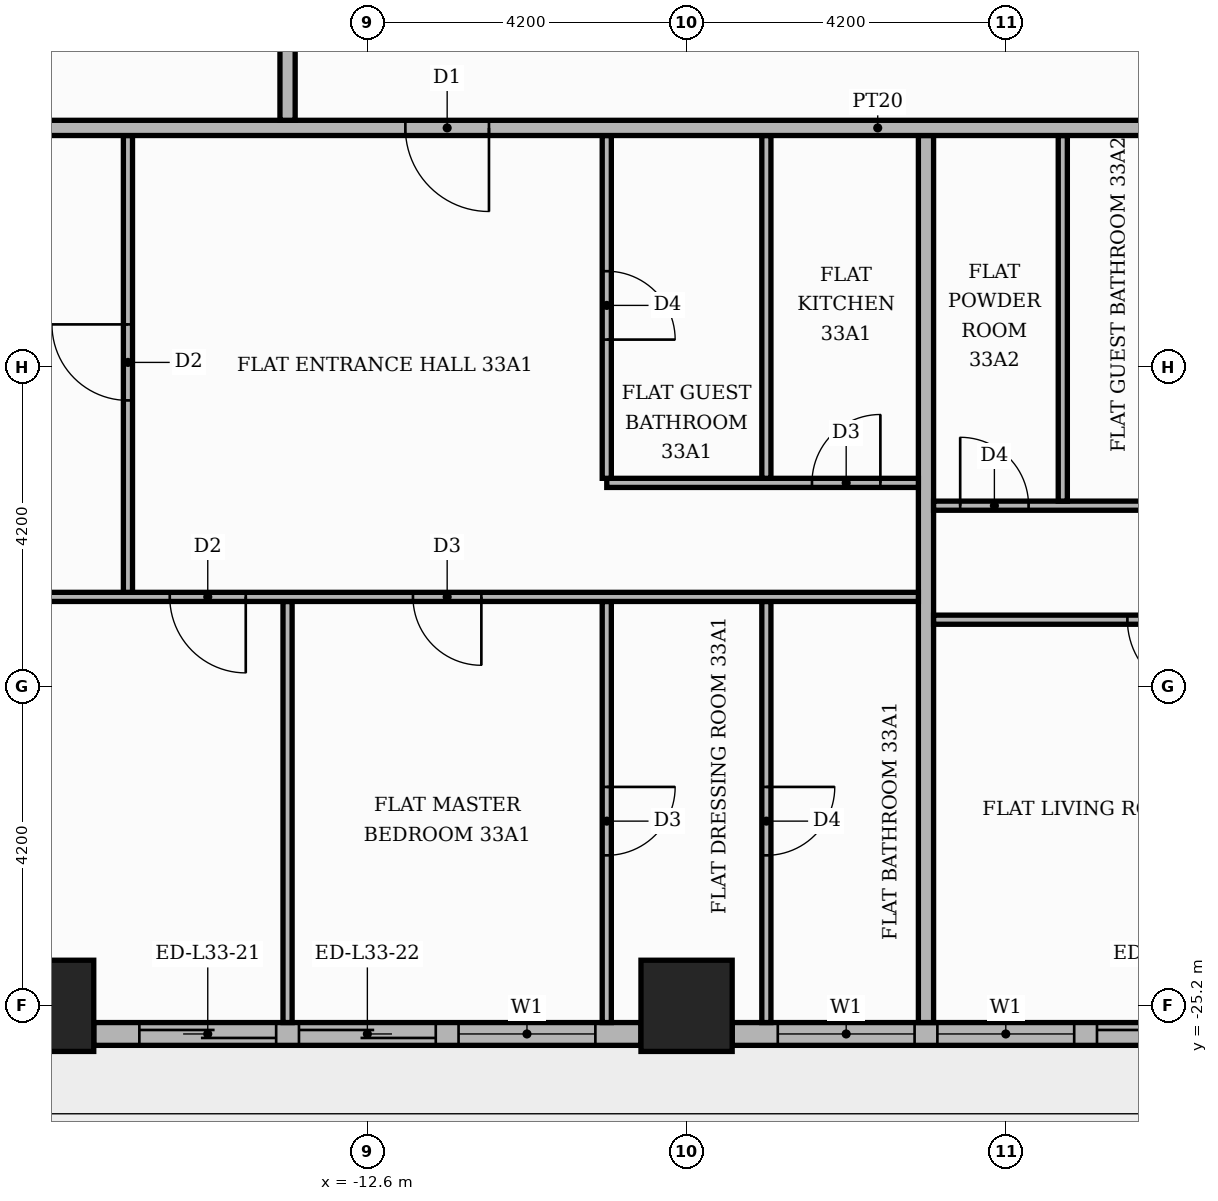
"""IFC4 building model, lengths in metres.
Left out: names, types, materials, properties, quantities, classifications, styles, units other than length and angle.
Written with IfcOpenShell. Run it as: python <this file> out.ifc"""

import sys

from ifc_helpers import new_model, si_unit, direction, frame, frame_2d, origin, origin_2d, place, context, subcontext, project, spatial, rectangle, extrude, element, fill, save


model = new_model("IFC4")
c1 = context("Model", 3, precision=1e-05, world=origin(), true_north=direction((0.0, 1.0)))
c2 = subcontext(c1, "Body", "Model", "MODEL_VIEW")
j1 = project(units=[si_unit("LENGTHUNIT", "METRE"), si_unit("PLANEANGLEUNIT", "RADIAN")], contexts=[c1])
p1 = place(None, origin())
s1 = spatial("IfcSite", under=j1, at=p1, CompositionType="ELEMENT")
p2 = place(p1, origin())
s2 = spatial("IfcBuilding", under=s1, at=p2, CompositionType="ELEMENT")
p3 = place(p2, frame((0.0, 0.0, 141.6)))
s3 = spatial("IfcBuildingStorey", under=s2, at=p3, CompositionType="ELEMENT", Elevation=141.6)
for number, where, z_axis, x_axis in (
    (1, (-8.4, -25.2, 0.0), (0.0, 0.0, 1.0), (1.0, 0.0, 0.0)),
    (2, (-16.8, -25.2, 0.0), (0.0, 0.0, 1.0), (1.0, 0.0, 0.0)),
):
    element("IfcColumn", number, at=place(p3, frame(where, z_axis=z_axis, x_axis=x_axis)), inside=s3, PredefinedType="COLUMN", context=c2, shape_type="SweptSolid", body=[
        extrude(rectangle(XDim=1.2, YDim=1.2, at=origin_2d()), origin(), (0.0, 0.0, 1.0), 3.9),
    ])
p4 = place(p3, frame((-16.2, -25.57, 0.0), z_axis=(0.0, 0.0, 1.0), x_axis=(1.0, 0.0, 0.0)))
e3 = element("IfcWall", 3, at=p4, inside=s3, PredefinedType="STANDARD", context=c2, shape_type="SweptSolid", body=[
    extrude(rectangle(XDim=7.2, YDim=0.3, at=frame_2d((3.6, 0.0))), origin(), (0.0, 0.0, 1.0), 3.48),
])
p5 = place(p4, frame((0.6, 0.0, 0.0)))
e4 = element("IfcOpeningElement", 4, at=p5, cuts=e3, PredefinedType="OPENING", context=c2, shape_type="SweptSolid", body=[
    extrude(rectangle(XDim=1.8, YDim=2.4, at=frame_2d((0.9, 1.2))), frame((0.0, 0.16, 0.0), z_axis=(0.0, -1.0, 0.0), x_axis=(1.0, 0.0, 0.0)), (0.0, 0.0, 1.0), 0.32),
])
p6 = place(p4, frame((2.7, 0.0, 0.0)))
e5 = element("IfcOpeningElement", 5, at=p6, cuts=e3, PredefinedType="OPENING", context=c2, shape_type="SweptSolid", body=[
    extrude(rectangle(XDim=1.8, YDim=2.4, at=frame_2d((0.9, 1.2))), frame((0.0, 0.16, 0.0), z_axis=(0.0, -1.0, 0.0), x_axis=(1.0, 0.0, 0.0)), (0.0, 0.0, 1.0), 0.32),
])
p7 = place(p4, frame((4.8, 0.0, 0.9)))
e6 = element("IfcOpeningElement", 6, at=p7, cuts=e3, PredefinedType="OPENING", context=c2, shape_type="SweptSolid", body=[
    extrude(rectangle(XDim=1.8, YDim=2.1, at=frame_2d((0.9, 1.05))), frame((0.0, 0.16, 0.0), z_axis=(0.0, -1.0, 0.0), x_axis=(1.0, 0.0, 0.0)), (0.0, 0.0, 1.0), 0.32),
])
p8 = place(p3, frame((-7.8, -25.57, 0.0), z_axis=(0.0, 0.0, 1.0), x_axis=(1.0, 0.0, 0.0)))
e7 = element("IfcWall", 7, at=p8, inside=s3, PredefinedType="STANDARD", context=c2, shape_type="SweptSolid", body=[
    extrude(rectangle(XDim=7.2, YDim=0.3, at=frame_2d((3.6, 0.0))), origin(), (0.0, 0.0, 1.0), 3.48),
])
p9 = place(p8, frame((0.6, 0.0, 0.9)))
e8 = element("IfcOpeningElement", 8, at=p9, cuts=e7, PredefinedType="OPENING", context=c2, shape_type="SweptSolid", body=[
    extrude(rectangle(XDim=1.8, YDim=2.1, at=frame_2d((0.9, 1.05))), frame((0.0, 0.16, 0.0), z_axis=(0.0, -1.0, 0.0), x_axis=(1.0, 0.0, 0.0)), (0.0, 0.0, 1.0), 0.32),
])
p10 = place(p8, frame((2.7, 0.0, 0.9)))
e9 = element("IfcOpeningElement", 9, at=p10, cuts=e7, PredefinedType="OPENING", context=c2, shape_type="SweptSolid", body=[
    extrude(rectangle(XDim=1.8, YDim=2.1, at=frame_2d((0.9, 1.05))), frame((0.0, 0.16, 0.0), z_axis=(0.0, -1.0, 0.0), x_axis=(1.0, 0.0, 0.0)), (0.0, 0.0, 1.0), 0.32),
])
p11 = place(p8, frame((4.8, 0.0, 0.0)))
e10 = element("IfcOpeningElement", 10, at=p11, cuts=e7, PredefinedType="OPENING", context=c2, shape_type="SweptSolid", body=[
    extrude(rectangle(XDim=1.8, YDim=2.4, at=frame_2d((0.9, 1.2))), frame((0.0, 0.16, 0.0), z_axis=(0.0, -1.0, 0.0), x_axis=(1.0, 0.0, 0.0)), (0.0, 0.0, 1.0), 0.32),
])
p12 = place(p3, frame((-13.65, -25.42, 0.0), z_axis=(0.0, 0.0, 1.0), x_axis=(0.0, 1.0, 0.0)))
e11 = element("IfcWall", 11, at=p12, inside=s3, PredefinedType="PARTITIONING", context=c2, shape_type="SweptSolid", body=[
    extrude(rectangle(XDim=5.54, YDim=0.12, at=frame_2d((2.77, 0.0))), origin(), (0.0, 0.0, 1.0), 3.48),
])
p13 = place(p3, frame((-9.45, -25.42, 0.0), z_axis=(0.0, 0.0, 1.0), x_axis=(0.0, 1.0, 0.0)))
e12 = element("IfcWall", 12, at=p13, inside=s3, PredefinedType="PARTITIONING", context=c2, shape_type="SweptSolid", body=[
    extrude(rectangle(XDim=5.54, YDim=0.12, at=frame_2d((2.77, 0.0))), origin(), (0.0, 0.0, 1.0), 3.48),
])
p14 = place(p13, frame((2.2, 0.0, 0.0)))
e13 = element("IfcOpeningElement", 13, at=p14, cuts=e12, PredefinedType="OPENING", context=c2, shape_type="SweptSolid", body=[
    extrude(rectangle(XDim=0.9, YDim=2.1, at=frame_2d((0.45, 1.05))), frame((0.0, 0.07, 0.0), z_axis=(0.0, -1.0, 0.0), x_axis=(1.0, 0.0, 0.0)), (0.0, 0.0, 1.0), 0.14),
])
p15 = place(p3, frame((-7.35, -25.42, 0.0), z_axis=(0.0, 0.0, 1.0), x_axis=(0.0, 1.0, 0.0)))
e14 = element("IfcWall", 14, at=p15, inside=s3, PredefinedType="PARTITIONING", context=c2, shape_type="SweptSolid", body=[
    extrude(rectangle(XDim=5.54, YDim=0.12, at=frame_2d((2.77, 0.0))), origin(), (0.0, 0.0, 1.0), 3.48),
])
p16 = place(p15, frame((2.2, 0.0, 0.0)))
e15 = element("IfcOpeningElement", 15, at=p16, cuts=e14, PredefinedType="OPENING", context=c2, shape_type="SweptSolid", body=[
    extrude(rectangle(XDim=0.9, YDim=2.1, at=frame_2d((0.45, 1.05))), frame((0.0, 0.07, 0.0), z_axis=(0.0, -1.0, 0.0), x_axis=(1.0, 0.0, 0.0)), (0.0, 0.0, 1.0), 0.14),
])
p17 = place(p3, frame((-5.25, -25.42, 0.0), z_axis=(0.0, 0.0, 1.0), x_axis=(0.0, 1.0, 0.0)))
e16 = element("IfcWall", 16, at=p17, inside=s3, PredefinedType="PARTITIONING", context=c2, shape_type="SweptSolid", body=[
    extrude(rectangle(XDim=11.67, YDim=0.2, at=frame_2d((5.835, 0.0))), origin(), (0.0, 0.0, 1.0), 3.48),
])
p18 = place(p3, frame((-5.15, -20.12, 0.0), z_axis=(0.0, 0.0, 1.0), x_axis=(1.0, 0.0, 0.0)))
e17 = element("IfcWall", 17, at=p18, inside=s3, PredefinedType="PARTITIONING", context=c2, shape_type="SweptSolid", body=[
    extrude(rectangle(XDim=18.7, YDim=0.12, at=frame_2d((9.35, 0.0))), origin(), (0.0, 0.0, 1.0), 3.48),
])
p19 = place(p18, frame((2.55, 0.0, 0.0)))
e18 = element("IfcOpeningElement", 18, at=p19, cuts=e17, PredefinedType="OPENING", context=c2, shape_type="SweptSolid", body=[
    extrude(rectangle(XDim=1.0, YDim=2.1, at=frame_2d((0.5, 1.05))), frame((0.0, 0.07, 0.0), z_axis=(0.0, -1.0, 0.0), x_axis=(1.0, 0.0, 0.0)), (0.0, 0.0, 1.0), 0.14),
])
p20 = place(p18, frame((7.85, 0.0, 0.0)))
e19 = element("IfcOpeningElement", 19, at=p20, cuts=e17, PredefinedType="OPENING", context=c2, shape_type="SweptSolid", body=[
    extrude(rectangle(XDim=0.9, YDim=2.1, at=frame_2d((0.45, 1.05))), frame((0.0, 0.07, 0.0), z_axis=(0.0, -1.0, 0.0), x_axis=(1.0, 0.0, 0.0)), (0.0, 0.0, 1.0), 0.14),
])
p21 = place(p18, frame((16.25, 0.0, 0.0)))
e20 = element("IfcOpeningElement", 20, at=p21, cuts=e17, PredefinedType="OPENING", context=c2, shape_type="SweptSolid", body=[
    extrude(rectangle(XDim=0.9, YDim=2.1, at=frame_2d((0.45, 1.05))), frame((0.0, 0.07, 0.0), z_axis=(0.0, -1.0, 0.0), x_axis=(1.0, 0.0, 0.0)), (0.0, 0.0, 1.0), 0.14),
])
p22 = place(p3, frame((-17.5, -19.82, 0.0), z_axis=(0.0, 0.0, 1.0), x_axis=(1.0, 0.0, 0.0)))
e21 = element("IfcWall", 21, at=p22, inside=s3, PredefinedType="PARTITIONING", context=c2, shape_type="SweptSolid", body=[
    extrude(rectangle(XDim=12.15, YDim=0.12, at=frame_2d((6.075, 0.0))), origin(), (0.0, 0.0, 1.0), 3.48),
])
p23 = place(p22, frame((2.3, 0.0, 0.0)))
e22 = element("IfcOpeningElement", 22, at=p23, cuts=e21, PredefinedType="OPENING", context=c2, shape_type="SweptSolid", body=[
    extrude(rectangle(XDim=1.0, YDim=2.1, at=frame_2d((0.5, 1.05))), frame((0.0, 0.07, 0.0), z_axis=(0.0, -1.0, 0.0), x_axis=(1.0, 0.0, 0.0)), (0.0, 0.0, 1.0), 0.14),
])
p24 = place(p22, frame((5.5, 0.0, 0.0)))
e23 = element("IfcOpeningElement", 23, at=p24, cuts=e21, PredefinedType="OPENING", context=c2, shape_type="SweptSolid", body=[
    extrude(rectangle(XDim=0.9, YDim=2.1, at=frame_2d((0.45, 1.05))), frame((0.0, 0.07, 0.0), z_axis=(0.0, -1.0, 0.0), x_axis=(1.0, 0.0, 0.0)), (0.0, 0.0, 1.0), 0.14),
])
p25 = place(p3, frame((-15.75, -19.76, 0.0), z_axis=(0.0, 0.0, 1.0), x_axis=(0.0, 1.0, 0.0)))
e24 = element("IfcWall", 24, at=p25, inside=s3, PredefinedType="PARTITIONING", context=c2, shape_type="SweptSolid", body=[
    extrude(rectangle(XDim=6.01, YDim=0.12, at=frame_2d((3.005, 0.0))), origin(), (0.0, 0.0, 1.0), 3.48),
])
p26 = place(p25, frame((2.525, 0.0, 0.0)))
e25 = element("IfcOpeningElement", 25, at=p26, cuts=e24, PredefinedType="OPENING", context=c2, shape_type="SweptSolid", body=[
    extrude(rectangle(XDim=1.0, YDim=2.1, at=frame_2d((0.5, 1.05))), frame((0.0, 0.07, 0.0), z_axis=(0.0, -1.0, 0.0), x_axis=(1.0, 0.0, 0.0)), (0.0, 0.0, 1.0), 0.14),
])
p27 = place(p3, frame((-5.15, -18.62, 0.0), z_axis=(0.0, 0.0, 1.0), x_axis=(1.0, 0.0, 0.0)))
e26 = element("IfcWall", 26, at=p27, inside=s3, PredefinedType="PARTITIONING", context=c2, shape_type="SweptSolid", body=[
    extrude(rectangle(XDim=4.1, YDim=0.12, at=frame_2d((2.05, 0.0))), origin(), (0.0, 0.0, 1.0), 3.48),
])
p28 = place(p27, frame((0.35, 0.0, 0.0)))
e27 = element("IfcOpeningElement", 27, at=p28, cuts=e26, PredefinedType="OPENING", context=c2, shape_type="SweptSolid", body=[
    extrude(rectangle(XDim=0.9, YDim=2.1, at=frame_2d((0.45, 1.05))), frame((0.0, 0.07, 0.0), z_axis=(0.0, -1.0, 0.0), x_axis=(1.0, 0.0, 0.0)), (0.0, 0.0, 1.0), 0.14),
])
p29 = place(p3, frame((-3.45, -18.56, 0.0), z_axis=(0.0, 0.0, 1.0), x_axis=(0.0, 1.0, 0.0)))
e28 = element("IfcWall", 28, at=p29, inside=s3, PredefinedType="PARTITIONING", context=c2, shape_type="SweptSolid", body=[
    extrude(rectangle(XDim=4.81, YDim=0.12, at=frame_2d((2.405, 0.0))), origin(), (0.0, 0.0, 1.0), 3.48),
])
p30 = place(p3, frame((-9.45, -18.32, 0.0), z_axis=(0.0, 0.0, 1.0), x_axis=(1.0, 0.0, 0.0)))
e29 = element("IfcWall", 29, at=p30, inside=s3, PredefinedType="PARTITIONING", context=c2, shape_type="SweptSolid", body=[
    extrude(rectangle(XDim=4.1, YDim=0.12, at=frame_2d((2.05, 0.0))), origin(), (0.0, 0.0, 1.0), 3.48),
])
p31 = place(p30, frame((2.7, 0.0, 0.0)))
e30 = element("IfcOpeningElement", 30, at=p31, cuts=e29, PredefinedType="OPENING", context=c2, shape_type="SweptSolid", body=[
    extrude(rectangle(XDim=0.9, YDim=2.1, at=frame_2d((0.45, 1.05))), frame((0.0, 0.07, 0.0), z_axis=(0.0, -1.0, 0.0), x_axis=(1.0, 0.0, 0.0)), (0.0, 0.0, 1.0), 0.14),
])
p32 = place(p3, frame((-9.45, -18.26, 0.0), z_axis=(0.0, 0.0, 1.0), x_axis=(0.0, 1.0, 0.0)))
e31 = element("IfcWall", 31, at=p32, inside=s3, PredefinedType="PARTITIONING", context=c2, shape_type="SweptSolid", body=[
    extrude(rectangle(XDim=4.51, YDim=0.12, at=frame_2d((2.255, 0.0))), origin(), (0.0, 0.0, 1.0), 3.48),
])
p33 = place(p32, frame((1.825, 0.0, 0.0)))
e32 = element("IfcOpeningElement", 32, at=p33, cuts=e31, PredefinedType="OPENING", context=c2, shape_type="SweptSolid", body=[
    extrude(rectangle(XDim=0.9, YDim=2.1, at=frame_2d((0.45, 1.05))), frame((0.0, 0.07, 0.0), z_axis=(0.0, -1.0, 0.0), x_axis=(1.0, 0.0, 0.0)), (0.0, 0.0, 1.0), 0.14),
])
p34 = place(p3, frame((-7.35, -18.26, 0.0), z_axis=(0.0, 0.0, 1.0), x_axis=(0.0, 1.0, 0.0)))
e33 = element("IfcWall", 33, at=p34, inside=s3, PredefinedType="PARTITIONING", context=c2, shape_type="SweptSolid", body=[
    extrude(rectangle(XDim=4.51, YDim=0.12, at=frame_2d((2.255, 0.0))), origin(), (0.0, 0.0, 1.0), 3.48),
])
p35 = place(p3, frame((-25.42, -13.65, 0.0), z_axis=(0.0, 0.0, 1.0), x_axis=(1.0, 0.0, 0.0)))
e34 = element("IfcWall", 34, at=p35, inside=s3, PredefinedType="PARTITIONING", context=c2, shape_type="SweptSolid", body=[
    extrude(rectangle(XDim=39.07, YDim=0.2, at=frame_2d((19.535, 0.0))), origin(), (0.0, 0.0, 1.0), 3.48),
])
p36 = place(p35, frame((13.32, 0.0, 0.0)))
e35 = element("IfcOpeningElement", 35, at=p36, cuts=e34, PredefinedType="OPENING", context=c2, shape_type="SweptSolid", body=[
    extrude(rectangle(XDim=1.1, YDim=2.4, at=frame_2d((0.55, 1.2))), frame((0.0, 0.11, 0.0), z_axis=(0.0, -1.0, 0.0), x_axis=(1.0, 0.0, 0.0)), (0.0, 0.0, 1.0), 0.22),
])
p37 = place(p35, frame((25.92, 0.0, 0.0)))
e36 = element("IfcOpeningElement", 36, at=p37, cuts=e34, PredefinedType="OPENING", context=c2, shape_type="SweptSolid", body=[
    extrude(rectangle(XDim=1.1, YDim=2.4, at=frame_2d((0.55, 1.2))), frame((0.0, 0.11, 0.0), z_axis=(0.0, -1.0, 0.0), x_axis=(1.0, 0.0, 0.0)), (0.0, 0.0, 1.0), 0.22),
])
p38 = place(p3, frame((-13.65, -13.55, 0.0), z_axis=(0.0, 0.0, 1.0), x_axis=(0.0, 1.0, 0.0)))
e37 = element("IfcWall", 37, at=p38, inside=s3, PredefinedType="PARTITIONING", context=c2, shape_type="SweptSolid", body=[
    extrude(rectangle(XDim=2.45, YDim=0.2, at=frame_2d((1.225, 0.0))), origin(), (0.0, 0.0, 1.0), 3.48),
])
p39 = place(p5, origin())
e38 = element("IfcDoor", 38, at=p39, inside=s3, OperationType="SLIDING_TO_LEFT", PredefinedType="DOOR", context=c2, shape_type="SweptSolid", body=[
    extrude(rectangle(XDim=1.8, YDim=2.4, at=frame_2d((0.9, 1.2))), frame((0.0, 0.025, 0.0), z_axis=(0.0, -1.0, 0.0), x_axis=(1.0, 0.0, 0.0)), (0.0, 0.0, 1.0), 0.05),
])
fill(e4, e38)
p40 = place(p6, origin())
e39 = element("IfcDoor", 39, at=p40, inside=s3, OperationType="SLIDING_TO_RIGHT", PredefinedType="DOOR", context=c2, shape_type="SweptSolid", body=[
    extrude(rectangle(XDim=1.8, YDim=2.4, at=frame_2d((0.9, 1.2))), frame((0.0, 0.025, 0.0), z_axis=(0.0, -1.0, 0.0), x_axis=(1.0, 0.0, 0.0)), (0.0, 0.0, 1.0), 0.05),
])
fill(e5, e39)
p41 = place(p7, origin())
e40 = element("IfcWindow", 40, at=p41, inside=s3, PartitioningType="SINGLE_PANEL", PredefinedType="WINDOW", context=c2, shape_type="SweptSolid", body=[
    extrude(rectangle(XDim=1.8, YDim=2.1, at=frame_2d((0.9, 1.05))), frame((0.0, 0.03, 0.0), z_axis=(0.0, -1.0, 0.0), x_axis=(1.0, 0.0, 0.0)), (0.0, 0.0, 1.0), 0.06),
])
fill(e6, e40)
p42 = place(p9, origin())
e41 = element("IfcWindow", 41, at=p42, inside=s3, PartitioningType="SINGLE_PANEL", PredefinedType="WINDOW", context=c2, shape_type="SweptSolid", body=[
    extrude(rectangle(XDim=1.8, YDim=2.1, at=frame_2d((0.9, 1.05))), frame((0.0, 0.03, 0.0), z_axis=(0.0, -1.0, 0.0), x_axis=(1.0, 0.0, 0.0)), (0.0, 0.0, 1.0), 0.06),
])
fill(e8, e41)
p43 = place(p10, origin())
e42 = element("IfcWindow", 42, at=p43, inside=s3, PartitioningType="SINGLE_PANEL", PredefinedType="WINDOW", context=c2, shape_type="SweptSolid", body=[
    extrude(rectangle(XDim=1.8, YDim=2.1, at=frame_2d((0.9, 1.05))), frame((0.0, 0.03, 0.0), z_axis=(0.0, -1.0, 0.0), x_axis=(1.0, 0.0, 0.0)), (0.0, 0.0, 1.0), 0.06),
])
fill(e9, e42)
p44 = place(p11, origin())
e43 = element("IfcDoor", 43, at=p44, inside=s3, OperationType="SLIDING_TO_RIGHT", PredefinedType="DOOR", context=c2, shape_type="SweptSolid", body=[
    extrude(rectangle(XDim=1.8, YDim=2.4, at=frame_2d((0.9, 1.2))), frame((0.0, 0.025, 0.0), z_axis=(0.0, -1.0, 0.0), x_axis=(1.0, 0.0, 0.0)), (0.0, 0.0, 1.0), 0.05),
])
fill(e10, e43)
p45 = place(p36, frame((1.1, 0.0, 0.0), z_axis=(0.0, 0.0, 1.0), x_axis=(-1.0, 0.0, 0.0)))
e44 = element("IfcDoor", 44, at=p45, inside=s3, OperationType="SINGLE_SWING_RIGHT", PredefinedType="DOOR", context=c2, shape_type="SweptSolid", body=[
    extrude(rectangle(XDim=1.1, YDim=2.4, at=frame_2d((0.55, 1.2))), frame((0.0, 0.025, 0.0), z_axis=(0.0, -1.0, 0.0), x_axis=(1.0, 0.0, 0.0)), (0.0, 0.0, 1.0), 0.05),
])
fill(e35, e44)
p46 = place(p26, origin())
e45 = element("IfcDoor", 45, at=p46, inside=s3, OperationType="SINGLE_SWING_RIGHT", PredefinedType="DOOR", context=c2, shape_type="SweptSolid", body=[
    extrude(rectangle(XDim=1.0, YDim=2.1, at=frame_2d((0.5, 1.05))), frame((0.0, 0.025, 0.0), z_axis=(0.0, -1.0, 0.0), x_axis=(1.0, 0.0, 0.0)), (0.0, 0.0, 1.0), 0.05),
])
fill(e25, e45)
p47 = place(p33, frame((0.9, 0.0, 0.0), z_axis=(0.0, 0.0, 1.0), x_axis=(-1.0, 0.0, 0.0)))
e46 = element("IfcDoor", 46, at=p47, inside=s3, OperationType="SINGLE_SWING_LEFT", PredefinedType="DOOR", context=c2, shape_type="SweptSolid", body=[
    extrude(rectangle(XDim=0.9, YDim=2.1, at=frame_2d((0.45, 1.05))), frame((0.0, 0.025, 0.0), z_axis=(0.0, -1.0, 0.0), x_axis=(1.0, 0.0, 0.0)), (0.0, 0.0, 1.0), 0.05),
])
fill(e32, e46)
p48 = place(p31, origin())
e47 = element("IfcDoor", 47, at=p48, inside=s3, OperationType="SINGLE_SWING_RIGHT", PredefinedType="DOOR", context=c2, shape_type="SweptSolid", body=[
    extrude(rectangle(XDim=0.9, YDim=2.1, at=frame_2d((0.45, 1.05))), frame((0.0, 0.025, 0.0), z_axis=(0.0, -1.0, 0.0), x_axis=(1.0, 0.0, 0.0)), (0.0, 0.0, 1.0), 0.05),
])
fill(e30, e47)
p49 = place(p23, frame((1.0, 0.0, 0.0), z_axis=(0.0, 0.0, 1.0), x_axis=(-1.0, 0.0, 0.0)))
e48 = element("IfcDoor", 48, at=p49, inside=s3, OperationType="SINGLE_SWING_RIGHT", PredefinedType="DOOR", context=c2, shape_type="SweptSolid", body=[
    extrude(rectangle(XDim=1.0, YDim=2.1, at=frame_2d((0.5, 1.05))), frame((0.0, 0.025, 0.0), z_axis=(0.0, -1.0, 0.0), x_axis=(1.0, 0.0, 0.0)), (0.0, 0.0, 1.0), 0.05),
])
fill(e22, e48)
p50 = place(p24, frame((0.9, 0.0, 0.0), z_axis=(0.0, 0.0, 1.0), x_axis=(-1.0, 0.0, 0.0)))
e49 = element("IfcDoor", 49, at=p50, inside=s3, OperationType="SINGLE_SWING_RIGHT", PredefinedType="DOOR", context=c2, shape_type="SweptSolid", body=[
    extrude(rectangle(XDim=0.9, YDim=2.1, at=frame_2d((0.45, 1.05))), frame((0.0, 0.025, 0.0), z_axis=(0.0, -1.0, 0.0), x_axis=(1.0, 0.0, 0.0)), (0.0, 0.0, 1.0), 0.05),
])
fill(e23, e49)
p51 = place(p14, frame((0.9, 0.0, 0.0), z_axis=(0.0, 0.0, 1.0), x_axis=(-1.0, 0.0, 0.0)))
e50 = element("IfcDoor", 50, at=p51, inside=s3, OperationType="SINGLE_SWING_RIGHT", PredefinedType="DOOR", context=c2, shape_type="SweptSolid", body=[
    extrude(rectangle(XDim=0.9, YDim=2.1, at=frame_2d((0.45, 1.05))), frame((0.0, 0.025, 0.0), z_axis=(0.0, -1.0, 0.0), x_axis=(1.0, 0.0, 0.0)), (0.0, 0.0, 1.0), 0.05),
])
fill(e13, e50)
p52 = place(p16, frame((0.9, 0.0, 0.0), z_axis=(0.0, 0.0, 1.0), x_axis=(-1.0, 0.0, 0.0)))
e51 = element("IfcDoor", 51, at=p52, inside=s3, OperationType="SINGLE_SWING_RIGHT", PredefinedType="DOOR", context=c2, shape_type="SweptSolid", body=[
    extrude(rectangle(XDim=0.9, YDim=2.1, at=frame_2d((0.45, 1.05))), frame((0.0, 0.025, 0.0), z_axis=(0.0, -1.0, 0.0), x_axis=(1.0, 0.0, 0.0)), (0.0, 0.0, 1.0), 0.05),
])
fill(e15, e51)
p53 = place(p28, origin())
e52 = element("IfcDoor", 52, at=p53, inside=s3, OperationType="SINGLE_SWING_LEFT", PredefinedType="DOOR", context=c2, shape_type="SweptSolid", body=[
    extrude(rectangle(XDim=0.9, YDim=2.1, at=frame_2d((0.45, 1.05))), frame((0.0, 0.025, 0.0), z_axis=(0.0, -1.0, 0.0), x_axis=(1.0, 0.0, 0.0)), (0.0, 0.0, 1.0), 0.05),
])
fill(e27, e52)
p54 = place(p19, frame((1.0, 0.0, 0.0), z_axis=(0.0, 0.0, 1.0), x_axis=(-1.0, 0.0, 0.0)))
e53 = element("IfcDoor", 53, at=p54, inside=s3, OperationType="SINGLE_SWING_RIGHT", PredefinedType="DOOR", context=c2, shape_type="SweptSolid", body=[
    extrude(rectangle(XDim=1.0, YDim=2.1, at=frame_2d((0.5, 1.05))), frame((0.0, 0.025, 0.0), z_axis=(0.0, -1.0, 0.0), x_axis=(1.0, 0.0, 0.0)), (0.0, 0.0, 1.0), 0.05),
])
fill(e18, e53)
save(model, sys.argv[1])
